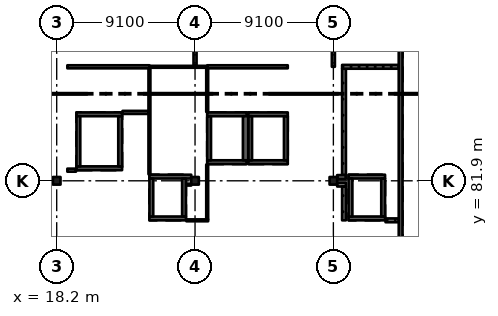
"""IFC4 building model, lengths in metres.
Left out: names, types, materials, properties, quantities, classifications, styles, units other than length and angle.
Written with IfcOpenShell. Run it as: python <this file> out.ifc"""

import sys

from ifc_helpers import new_model, si_unit, direction, frame, frame_2d, origin, origin_2d, place, context, subcontext, project, spatial, rectangle, extrude, element, fill, save


model = new_model("IFC4")
c1 = context("Model", 3, precision=1e-05, world=origin(), true_north=direction((0.0, 1.0)))
c2 = subcontext(c1, "Body", "Model", "MODEL_VIEW")
j1 = project(units=[si_unit("LENGTHUNIT", "METRE"), si_unit("PLANEANGLEUNIT", "RADIAN")], contexts=[c1])
p1 = place(None, origin())
s1 = spatial("IfcSite", under=j1, at=p1, CompositionType="ELEMENT")
p2 = place(p1, origin())
s2 = spatial("IfcBuilding", under=s1, at=p2, CompositionType="ELEMENT")
p3 = place(p2, frame((0.0, 0.0, 24.57)))
s3 = spatial("IfcBuildingStorey", under=s2, at=p3, CompositionType="ELEMENT", Elevation=24.57)
for number, where, z_axis, x_axis in (
    (1, (18.2, 81.9, 0.0), (0.0, 0.0, 1.0), (1.0, 0.0, 0.0)),
    (2, (27.3, 81.9, 0.0), (0.0, 0.0, 1.0), (1.0, 0.0, 0.0)),
    (3, (36.4, 81.9, 0.0), (0.0, 0.0, 1.0), (1.0, 0.0, 0.0)),
):
    element("IfcColumn", number, at=place(p3, frame(where, z_axis=z_axis, x_axis=x_axis)), inside=s3, PredefinedType="COLUMN", context=c2, shape_type="SweptSolid", body=[
        extrude(rectangle(XDim=0.5, YDim=0.5, at=origin_2d()), origin(), (0.0, 0.0, 1.0), 4.55),
    ])
p4 = place(p3, frame((40.825, 68.25, 0.0), z_axis=(0.0, 0.0, 1.0), x_axis=(0.0, 1.0, 0.0)))
e4 = element("IfcWall", 4, at=p4, inside=s3, PredefinedType="SHEAR", context=c2, shape_type="SweptSolid", body=[
    extrude(rectangle(XDim=31.85, YDim=0.25, at=frame_2d((15.925, 0.0))), origin(), (0.0, 0.0, 1.0), 4.55),
])
p5 = place(p3, frame((30.7, 83.125, 0.0), z_axis=(0.0, 0.0, 1.0), x_axis=(-1.0, 0.0, 0.0)))
e5 = element("IfcWall", 5, at=p5, inside=s3, PredefinedType="SHEAR", context=c2, shape_type="SweptSolid", body=[
    extrude(rectangle(XDim=2.6, YDim=0.25, at=frame_2d((1.3, 0.0))), origin(), (0.0, 0.0, 1.0), 4.55),
])
p6 = place(p3, frame((30.7, 86.275, 0.0), z_axis=(0.0, 0.0, 1.0), x_axis=(-1.0, 0.0, 0.0)))
e6 = element("IfcWall", 6, at=p6, inside=s3, PredefinedType="SHEAR", context=c2, shape_type="SweptSolid", body=[
    extrude(rectangle(XDim=2.6, YDim=0.25, at=frame_2d((1.3, 0.0))), origin(), (0.0, 0.0, 1.0), 4.55),
])
p7 = place(p6, frame((0.8, 0.0, 0.0)))
e7 = element("IfcOpeningElement", 7, at=p7, cuts=e6, PredefinedType="OPENING", context=c2, shape_type="SweptSolid", body=[
    extrude(rectangle(XDim=1.0, YDim=2.1, at=frame_2d((0.5, 1.05))), frame((0.0, 0.135, 0.0), z_axis=(0.0, -1.0, 0.0), x_axis=(1.0, 0.0, 0.0)), (0.0, 0.0, 1.0), 0.27),
])
p8 = place(p3, frame((28.225, 86.15, 0.0), z_axis=(0.0, 0.0, 1.0), x_axis=(0.0, -1.0, 0.0)))
e8 = element("IfcWall", 8, at=p8, inside=s3, PredefinedType="SHEAR", context=c2, shape_type="SweptSolid", body=[
    extrude(rectangle(XDim=2.9, YDim=0.25, at=frame_2d((1.45, 0.0))), origin(), (0.0, 0.0, 1.0), 4.55),
])
p9 = place(p3, frame((30.625, 86.15, 0.0), z_axis=(0.0, 0.0, 1.0), x_axis=(0.0, -1.0, 0.0)))
e9 = element("IfcWall", 9, at=p9, inside=s3, PredefinedType="SHEAR", context=c2, shape_type="SweptSolid", body=[
    extrude(rectangle(XDim=2.9, YDim=0.35, at=frame_2d((1.45, 0.0))), origin(), (0.0, 0.0, 1.0), 4.55),
])
p10 = place(p3, frame((33.4, 83.125, 0.0), z_axis=(0.0, 0.0, 1.0), x_axis=(-1.0, 0.0, 0.0)))
e10 = element("IfcWall", 10, at=p10, inside=s3, PredefinedType="SHEAR", context=c2, shape_type="SweptSolid", body=[
    extrude(rectangle(XDim=2.6, YDim=0.25, at=frame_2d((1.3, 0.0))), origin(), (0.0, 0.0, 1.0), 4.55),
])
p11 = place(p3, frame((33.4, 86.275, 0.0), z_axis=(0.0, 0.0, 1.0), x_axis=(-1.0, 0.0, 0.0)))
e11 = element("IfcWall", 11, at=p11, inside=s3, PredefinedType="SHEAR", context=c2, shape_type="SweptSolid", body=[
    extrude(rectangle(XDim=2.6, YDim=0.25, at=frame_2d((1.3, 0.0))), origin(), (0.0, 0.0, 1.0), 4.55),
])
p12 = place(p11, frame((0.8, 0.0, 0.0)))
e12 = element("IfcOpeningElement", 12, at=p12, cuts=e11, PredefinedType="OPENING", context=c2, shape_type="SweptSolid", body=[
    extrude(rectangle(XDim=1.0, YDim=2.1, at=frame_2d((0.5, 1.05))), frame((0.0, 0.135, 0.0), z_axis=(0.0, -1.0, 0.0), x_axis=(1.0, 0.0, 0.0)), (0.0, 0.0, 1.0), 0.27),
])
for number, where, z_axis, x_axis in (
    (13, (30.925, 86.15, 0.0), (0.0, 0.0, 1.0), (0.0, -1.0, 0.0)),
    (14, (33.275, 86.15, 0.0), (0.0, 0.0, 1.0), (0.0, -1.0, 0.0)),
):
    element("IfcWall", number, at=place(p3, frame(where, z_axis=z_axis, x_axis=x_axis)), inside=s3, PredefinedType="SHEAR", context=c2, shape_type="SweptSolid", body=[
        extrude(rectangle(XDim=2.9, YDim=0.25, at=frame_2d((1.45, 0.0))), origin(), (0.0, 0.0, 1.0), 4.55),
    ])
p13 = place(p3, frame((39.8, 79.425, 0.0), z_axis=(0.0, 0.0, 1.0), x_axis=(-1.0, 0.0, 0.0)))
e15 = element("IfcWall", 15, at=p13, inside=s3, PredefinedType="SHEAR", context=c2, shape_type="SweptSolid", body=[
    extrude(rectangle(XDim=2.4, YDim=0.25, at=frame_2d((1.2, 0.0))), origin(), (0.0, 0.0, 1.0), 4.55),
])
p14 = place(p13, frame((0.75, 0.0, 0.0)))
e16 = element("IfcOpeningElement", 16, at=p14, cuts=e15, PredefinedType="OPENING", context=c2, shape_type="SweptSolid", body=[
    extrude(rectangle(XDim=0.9, YDim=2.1, at=frame_2d((0.45, 1.05))), frame((0.0, 0.135, 0.0), z_axis=(0.0, -1.0, 0.0), x_axis=(1.0, 0.0, 0.0)), (0.0, 0.0, 1.0), 0.27),
])
p15 = place(p3, frame((39.8, 82.175, 0.0), z_axis=(0.0, 0.0, 1.0), x_axis=(-1.0, 0.0, 0.0)))
e17 = element("IfcWall", 17, at=p15, inside=s3, PredefinedType="SHEAR", context=c2, shape_type="SweptSolid", body=[
    extrude(rectangle(XDim=2.4, YDim=0.25, at=frame_2d((1.2, 0.0))), origin(), (0.0, 0.0, 1.0), 4.55),
])
for number, where, z_axis, x_axis in (
    (18, (37.525, 82.05, 0.0), (0.0, 0.0, 1.0), (0.0, -1.0, 0.0)),
    (19, (39.675, 82.05, 0.0), (0.0, 0.0, 1.0), (0.0, -1.0, 0.0)),
):
    element("IfcWall", number, at=place(p3, frame(where, z_axis=z_axis, x_axis=x_axis)), inside=s3, PredefinedType="SHEAR", context=c2, shape_type="SweptSolid", body=[
        extrude(rectangle(XDim=2.5, YDim=0.25, at=frame_2d((1.25, 0.0))), origin(), (0.0, 0.0, 1.0), 4.55),
    ])
p16 = place(p3, frame((26.7, 79.425, 0.0), z_axis=(0.0, 0.0, 1.0), x_axis=(-1.0, 0.0, 0.0)))
e20 = element("IfcWall", 20, at=p16, inside=s3, PredefinedType="SHEAR", context=c2, shape_type="SweptSolid", body=[
    extrude(rectangle(XDim=2.4, YDim=0.25, at=frame_2d((1.2, 0.0))), origin(), (0.0, 0.0, 1.0), 4.55),
])
p17 = place(p3, frame((27.05, 82.175, 0.0), z_axis=(0.0, 0.0, 1.0), x_axis=(-1.0, 0.0, 0.0)))
e21 = element("IfcWall", 21, at=p17, inside=s3, PredefinedType="SHEAR", context=c2, shape_type="SweptSolid", body=[
    extrude(rectangle(XDim=2.75, YDim=0.25, at=frame_2d((1.375, 0.0))), origin(), (0.0, 0.0, 1.0), 4.55),
])
p18 = place(p3, frame((24.425, 82.05, 0.0), z_axis=(0.0, 0.0, 1.0), x_axis=(0.0, -1.0, 0.0)))
e22 = element("IfcWall", 22, at=p18, inside=s3, PredefinedType="SHEAR", context=c2, shape_type="SweptSolid", body=[
    extrude(rectangle(XDim=2.5, YDim=0.25, at=frame_2d((1.25, 0.0))), origin(), (0.0, 0.0, 1.0), 4.55),
])
p19 = place(p18, frame((0.9, 0.0, 0.0)))
e23 = element("IfcOpeningElement", 23, at=p19, cuts=e22, PredefinedType="OPENING", context=c2, shape_type="SweptSolid", body=[
    extrude(rectangle(XDim=0.7, YDim=2.1, at=frame_2d((0.35, 1.05))), frame((0.0, 0.135, 0.0), z_axis=(0.0, -1.0, 0.0), x_axis=(1.0, 0.0, 0.0)), (0.0, 0.0, 1.0), 0.27),
])
p20 = place(p3, frame((26.575, 82.05, 0.0), z_axis=(0.0, 0.0, 1.0), x_axis=(0.0, -1.0, 0.0)))
e24 = element("IfcWall", 24, at=p20, inside=s3, PredefinedType="SHEAR", context=c2, shape_type="SweptSolid", body=[
    extrude(rectangle(XDim=2.5, YDim=0.25, at=frame_2d((1.25, 0.0))), origin(), (0.0, 0.0, 1.0), 4.55),
])
p21 = place(p3, frame((22.5, 82.725, 0.0), z_axis=(0.0, 0.0, 1.0), x_axis=(-1.0, 0.0, 0.0)))
e25 = element("IfcWall", 25, at=p21, inside=s3, PredefinedType="SHEAR", context=c2, shape_type="SweptSolid", body=[
    extrude(rectangle(XDim=3.0, YDim=0.25, at=frame_2d((1.5, 0.0))), origin(), (0.0, 0.0, 1.0), 4.55),
])
p22 = place(p3, frame((22.5, 86.275, 0.0), z_axis=(0.0, 0.0, 1.0), x_axis=(-1.0, 0.0, 0.0)))
e26 = element("IfcWall", 26, at=p22, inside=s3, PredefinedType="SHEAR", context=c2, shape_type="SweptSolid", body=[
    extrude(rectangle(XDim=3.0, YDim=0.25, at=frame_2d((1.5, 0.0))), origin(), (0.0, 0.0, 1.0), 4.55),
])
p23 = place(p22, frame((0.95, 0.0, 0.0)))
e27 = element("IfcOpeningElement", 27, at=p23, cuts=e26, PredefinedType="OPENING", context=c2, shape_type="SweptSolid", body=[
    extrude(rectangle(XDim=1.1, YDim=2.1, at=frame_2d((0.55, 1.05))), frame((0.0, 0.135, 0.0), z_axis=(0.0, -1.0, 0.0), x_axis=(1.0, 0.0, 0.0)), (0.0, 0.0, 1.0), 0.27),
])
for number, where, z_axis, x_axis in (
    (28, (19.625, 86.15, 0.0), (0.0, 0.0, 1.0), (0.0, -1.0, 0.0)),
    (29, (22.375, 86.15, 0.0), (0.0, 0.0, 1.0), (0.0, -1.0, 0.0)),
):
    element("IfcWall", number, at=place(p3, frame(where, z_axis=z_axis, x_axis=x_axis)), inside=s3, PredefinedType="SHEAR", context=c2, shape_type="SweptSolid", body=[
        extrude(rectangle(XDim=3.3, YDim=0.25, at=frame_2d((1.65, 0.0))), origin(), (0.0, 0.0, 1.0), 4.55),
    ])
p24 = place(p3, frame((19.47, 82.6, 0.0), z_axis=(0.0, 0.0, 1.0), x_axis=(-1.0, 0.0, 0.0)))
e30 = element("IfcWall", 30, at=p24, inside=s3, PredefinedType="PARTITIONING", context=c2, shape_type="SweptSolid", body=[
    extrude(rectangle(XDim=0.57, YDim=0.2, at=frame_2d((0.285, 0.0))), origin(), (0.0, 0.0, 1.0), 4.35),
])
p25 = place(p3, frame((24.238, 86.4, 0.0), z_axis=(0.0, 0.0, 1.0), x_axis=(-1.0, 0.0, 0.0)))
e31 = element("IfcWall", 31, at=p25, inside=s3, PredefinedType="PARTITIONING", context=c2, shape_type="SweptSolid", body=[
    extrude(rectangle(XDim=1.708, YDim=0.2, at=frame_2d((0.854, 0.0))), origin(), (0.0, 0.0, 1.0), 4.35),
])
p26 = place(p3, frame((24.3, 82.33, 0.0), z_axis=(0.0, 0.0, 1.0), x_axis=(0.0, 1.0, 0.0)))
e32 = element("IfcWall", 32, at=p26, inside=s3, PredefinedType="PARTITIONING", context=c2, shape_type="SweptSolid", body=[
    extrude(rectangle(XDim=6.97, YDim=0.125, at=frame_2d((3.485, 0.0))), origin(), (0.0, 0.0, 1.0), 4.35),
])
p27 = place(p3, frame((24.3, 89.4, 0.0), z_axis=(0.0, 0.0, 1.0), x_axis=(-1.0, 0.0, 0.0)))
e33 = element("IfcWall", 33, at=p27, inside=s3, PredefinedType="PARTITIONING", context=c2, shape_type="SweptSolid", body=[
    extrude(rectangle(XDim=5.4, YDim=0.2, at=frame_2d((2.7, 0.0))), origin(), (0.0, 0.0, 1.0), 4.35),
])
p28 = place(p27, frame((1.85, 0.0, 0.0)))
e34 = element("IfcOpeningElement", 34, at=p28, cuts=e33, PredefinedType="OPENING", context=c2, shape_type="SweptSolid", body=[
    extrude(rectangle(XDim=1.8, YDim=2.4, at=frame_2d((0.9, 1.2))), frame((0.0, 0.11, 0.0), z_axis=(0.0, -1.0, 0.0), x_axis=(1.0, 0.0, 0.0)), (0.0, 0.0, 1.0), 0.22),
])
p29 = place(p3, frame((26.73, 81.65, 0.0), z_axis=(0.0, 0.0, 1.0), x_axis=(1.0, 0.0, 0.0)))
e35 = element("IfcWall", 35, at=p29, inside=s3, PredefinedType="PARTITIONING", context=c2, shape_type="SweptSolid", body=[
    extrude(rectangle(XDim=0.32, YDim=0.125, at=frame_2d((0.16, 0.0))), origin(), (0.0, 0.0, 1.0), 4.35),
])
p30 = place(p3, frame((24.3, 89.4, 0.0), z_axis=(0.0, 0.0, 1.0), x_axis=(1.0, 0.0, 0.0)))
e36 = element("IfcWall", 36, at=p30, inside=s3, PredefinedType="PARTITIONING", context=c2, shape_type="SweptSolid", body=[
    extrude(rectangle(XDim=3.8, YDim=0.125, at=frame_2d((1.9, 0.0))), origin(), (0.0, 0.0, 1.0), 4.35),
])
p31 = place(p30, frame((1.05, 0.0, 0.0)))
e37 = element("IfcOpeningElement", 37, at=p31, cuts=e36, PredefinedType="OPENING", context=c2, shape_type="SweptSolid", body=[
    extrude(rectangle(XDim=0.9, YDim=2.1, at=frame_2d((0.45, 1.05))), frame((0.0, 0.073, 0.0), z_axis=(0.0, -1.0, 0.0), x_axis=(1.0, 0.0, 0.0)), (0.0, 0.0, 1.0), 0.145),
])
p32 = place(p3, frame((27.3, 90.75, 0.0), z_axis=(0.0, 0.0, 1.0), x_axis=(0.0, -1.0, 0.0)))
e38 = element("IfcWall", 38, at=p32, inside=s3, PredefinedType="PARTITIONING", context=c2, shape_type="SweptSolid", body=[
    extrude(rectangle(XDim=1.288, YDim=0.2, at=frame_2d((0.644, 0.0))), origin(), (0.0, 0.0, 1.0), 3.6),
])
p33 = place(p3, frame((28.1, 82.97, 0.0), z_axis=(0.0, 0.0, 1.0), x_axis=(0.0, -1.0, 0.0)))
e39 = element("IfcWall", 39, at=p33, inside=s3, PredefinedType="PARTITIONING", context=c2, shape_type="SweptSolid", body=[
    extrude(rectangle(XDim=3.607, YDim=0.125, at=frame_2d((1.804, 0.0))), origin(), (0.0, 0.0, 1.0), 4.35),
])
p34 = place(p3, frame((28.1, 89.3, 0.0), z_axis=(0.0, 0.0, 1.0), x_axis=(0.0, -1.0, 0.0)))
e40 = element("IfcWall", 40, at=p34, inside=s3, PredefinedType="PARTITIONING", context=c2, shape_type="SweptSolid", body=[
    extrude(rectangle(XDim=2.87, YDim=0.125, at=frame_2d((1.435, 0.0))), origin(), (0.0, 0.0, 1.0), 4.35),
])
p35 = place(p3, frame((28.163, 79.3, 0.0), z_axis=(0.0, 0.0, 1.0), x_axis=(-1.0, 0.0, 0.0)))
e41 = element("IfcWall", 41, at=p35, inside=s3, PredefinedType="PARTITIONING", context=c2, shape_type="SweptSolid", body=[
    extrude(rectangle(XDim=1.433, YDim=0.125, at=frame_2d((0.716, 0.0))), origin(), (0.0, 0.0, 1.0), 4.35),
])
p36 = place(p3, frame((33.4, 89.4, 0.0), z_axis=(0.0, 0.0, 1.0), x_axis=(-1.0, 0.0, 0.0)))
e42 = element("IfcWall", 42, at=p36, inside=s3, PredefinedType="PARTITIONING", context=c2, shape_type="SweptSolid", body=[
    extrude(rectangle(XDim=5.3, YDim=0.2, at=frame_2d((2.65, 0.0))), origin(), (0.0, 0.0, 1.0), 4.35),
])
p37 = place(p36, frame((1.75, 0.0, 0.0)))
e43 = element("IfcOpeningElement", 43, at=p37, cuts=e42, PredefinedType="OPENING", context=c2, shape_type="SweptSolid", body=[
    extrude(rectangle(XDim=1.8, YDim=2.4, at=frame_2d((0.9, 1.2))), frame((0.0, 0.11, 0.0), z_axis=(0.0, -1.0, 0.0), x_axis=(1.0, 0.0, 0.0)), (0.0, 0.0, 1.0), 0.22),
])
p38 = place(p3, frame((36.4, 90.75, 0.0), z_axis=(0.0, 0.0, 1.0), x_axis=(0.0, -1.0, 0.0)))
e44 = element("IfcWall", 44, at=p38, inside=s3, PredefinedType="PARTITIONING", context=c2, shape_type="SweptSolid", body=[
    extrude(rectangle(XDim=1.35, YDim=0.2, at=frame_2d((0.675, 0.0))), origin(), (0.0, 0.0, 1.0), 3.6),
])
p39 = place(p3, frame((36.65, 81.65, 0.0), z_axis=(0.0, 0.0, 1.0), x_axis=(1.0, 0.0, 0.0)))
e45 = element("IfcWall", 45, at=p39, inside=s3, PredefinedType="SOLIDWALL", context=c2, shape_type="SweptSolid", body=[
    extrude(rectangle(XDim=0.575, YDim=0.25, at=frame_2d((0.288, 0.0))), origin(), (0.0, 0.0, 1.0), 4.35),
])
p40 = place(p3, frame((37.1, 81.525, 0.0), z_axis=(0.0, 0.0, 1.0), x_axis=(0.0, -1.0, 0.0)))
e46 = element("IfcWall", 46, at=p40, inside=s3, PredefinedType="SOLIDWALL", context=c2, shape_type="SweptSolid", body=[
    extrude(rectangle(XDim=2.225, YDim=0.25, at=frame_2d((1.112, 0.0))), origin(), (0.0, 0.0, 1.0), 4.35),
])
p41 = place(p3, frame((37.1, 89.275, 0.0), z_axis=(0.0, 0.0, 1.0), x_axis=(0.0, -1.0, 0.0)))
e47 = element("IfcWall", 47, at=p41, inside=s3, PredefinedType="SOLIDWALL", context=c2, shape_type="SweptSolid", body=[
    extrude(rectangle(XDim=7.0, YDim=0.25, at=frame_2d((3.5, 0.0))), origin(), (0.0, 0.0, 1.0), 4.35),
])
p42 = place(p3, frame((37.225, 82.15, 0.0), z_axis=(0.0, 0.0, 1.0), x_axis=(-1.0, 0.0, 0.0)))
e48 = element("IfcWall", 48, at=p42, inside=s3, PredefinedType="SOLIDWALL", context=c2, shape_type="SweptSolid", body=[
    extrude(rectangle(XDim=0.575, YDim=0.25, at=frame_2d((0.288, 0.0))), origin(), (0.0, 0.0, 1.0), 4.35),
])
p43 = place(p3, frame((40.7, 79.3, 0.0), z_axis=(0.0, 0.0, 1.0), x_axis=(-1.0, 0.0, 0.0)))
e49 = element("IfcWall", 49, at=p43, inside=s3, PredefinedType="SOLIDWALL", context=c2, shape_type="SweptSolid", body=[
    extrude(rectangle(XDim=0.87, YDim=0.25, at=frame_2d((0.435, 0.0))), origin(), (0.0, 0.0, 1.0), 4.35),
])
p44 = place(p3, frame((40.7, 89.4, 0.0), z_axis=(0.0, 0.0, 1.0), x_axis=(-1.0, 0.0, 0.0)))
e50 = element("IfcWall", 50, at=p44, inside=s3, PredefinedType="SOLIDWALL", context=c2, shape_type="SweptSolid", body=[
    extrude(rectangle(XDim=3.725, YDim=0.25, at=frame_2d((1.862, 0.0))), origin(), (0.0, 0.0, 1.0), 4.35),
])
p45 = place(p44, frame((1.35, 0.0, 0.0)))
e51 = element("IfcOpeningElement", 51, at=p45, cuts=e50, PredefinedType="OPENING", context=c2, shape_type="SweptSolid", body=[
    extrude(rectangle(XDim=1.0, YDim=2.1, at=frame_2d((0.5, 1.05))), frame((0.0, 0.135, 0.0), z_axis=(0.0, -1.0, 0.0), x_axis=(1.0, 0.0, 0.0)), (0.0, 0.0, 1.0), 0.27),
])
p46 = place(p31, origin())
e52 = element("IfcDoor", 52, at=p46, inside=s3, OperationType="SINGLE_SWING_LEFT", PredefinedType="DOOR", context=c2, shape_type="SweptSolid", body=[
    extrude(rectangle(XDim=0.9, YDim=2.1, at=frame_2d((0.45, 1.05))), frame((0.0, 0.025, 0.0), z_axis=(0.0, -1.0, 0.0), x_axis=(1.0, 0.0, 0.0)), (0.0, 0.0, 1.0), 0.05),
])
fill(e37, e52)
p47 = place(p45, origin())
e53 = element("IfcDoor", 53, at=p47, inside=s3, OperationType="SINGLE_SWING_RIGHT", PredefinedType="DOOR", context=c2, shape_type="SweptSolid", body=[
    extrude(rectangle(XDim=1.0, YDim=2.1, at=frame_2d((0.5, 1.05))), frame((0.0, 0.025, 0.0), z_axis=(0.0, -1.0, 0.0), x_axis=(1.0, 0.0, 0.0)), (0.0, 0.0, 1.0), 0.05),
])
fill(e51, e53)
p48 = place(p28, origin())
e54 = element("IfcDoor", 54, at=p48, inside=s3, OperationType="DOUBLE_DOOR_SINGLE_SWING", PredefinedType="DOOR", context=c2, shape_type="SweptSolid", body=[
    extrude(rectangle(XDim=1.8, YDim=2.4, at=frame_2d((0.9, 1.2))), frame((0.0, 0.025, 0.0), z_axis=(0.0, -1.0, 0.0), x_axis=(1.0, 0.0, 0.0)), (0.0, 0.0, 1.0), 0.05),
])
fill(e34, e54)
p49 = place(p37, origin())
e55 = element("IfcDoor", 55, at=p49, inside=s3, OperationType="DOUBLE_DOOR_SINGLE_SWING", PredefinedType="DOOR", context=c2, shape_type="SweptSolid", body=[
    extrude(rectangle(XDim=1.8, YDim=2.4, at=frame_2d((0.9, 1.2))), frame((0.0, 0.025, 0.0), z_axis=(0.0, -1.0, 0.0), x_axis=(1.0, 0.0, 0.0)), (0.0, 0.0, 1.0), 0.05),
])
fill(e43, e55)
p50 = place(p14, origin())
e56 = element("IfcDoor", 56, at=p50, inside=s3, OperationType="SINGLE_SWING_RIGHT", PredefinedType="DOOR", context=c2, shape_type="SweptSolid", body=[
    extrude(rectangle(XDim=0.9, YDim=2.1, at=frame_2d((0.45, 1.05))), frame((0.0, 0.025, 0.0), z_axis=(0.0, -1.0, 0.0), x_axis=(1.0, 0.0, 0.0)), (0.0, 0.0, 1.0), 0.05),
])
fill(e16, e56)
p51 = place(p19, origin())
e57 = element("IfcDoor", 57, at=p51, inside=s3, OperationType="SINGLE_SWING_LEFT", PredefinedType="DOOR", context=c2, shape_type="SweptSolid", body=[
    extrude(rectangle(XDim=0.7, YDim=2.1, at=frame_2d((0.35, 1.05))), frame((0.0, 0.025, 0.0), z_axis=(0.0, -1.0, 0.0), x_axis=(1.0, 0.0, 0.0)), (0.0, 0.0, 1.0), 0.05),
])
fill(e23, e57)
p52 = place(p7, origin())
e58 = element("IfcDoor", 58, at=p52, inside=s3, OperationType="DOUBLE_DOOR_SLIDING", PredefinedType="DOOR", context=c2, shape_type="SweptSolid", body=[
    extrude(rectangle(XDim=1.0, YDim=2.1, at=frame_2d((0.5, 1.05))), frame((0.0, 0.025, 0.0), z_axis=(0.0, -1.0, 0.0), x_axis=(1.0, 0.0, 0.0)), (0.0, 0.0, 1.0), 0.05),
])
fill(e7, e58)
p53 = place(p12, origin())
e59 = element("IfcDoor", 59, at=p53, inside=s3, OperationType="DOUBLE_DOOR_SLIDING", PredefinedType="DOOR", context=c2, shape_type="SweptSolid", body=[
    extrude(rectangle(XDim=1.0, YDim=2.1, at=frame_2d((0.5, 1.05))), frame((0.0, 0.025, 0.0), z_axis=(0.0, -1.0, 0.0), x_axis=(1.0, 0.0, 0.0)), (0.0, 0.0, 1.0), 0.05),
])
fill(e12, e59)
p54 = place(p23, origin())
e60 = element("IfcDoor", 60, at=p54, inside=s3, OperationType="DOUBLE_DOOR_SLIDING", PredefinedType="DOOR", context=c2, shape_type="SweptSolid", body=[
    extrude(rectangle(XDim=1.1, YDim=2.1, at=frame_2d((0.55, 1.05))), frame((0.0, 0.025, 0.0), z_axis=(0.0, -1.0, 0.0), x_axis=(1.0, 0.0, 0.0)), (0.0, 0.0, 1.0), 0.05),
])
fill(e27, e60)
save(model, sys.argv[1])
